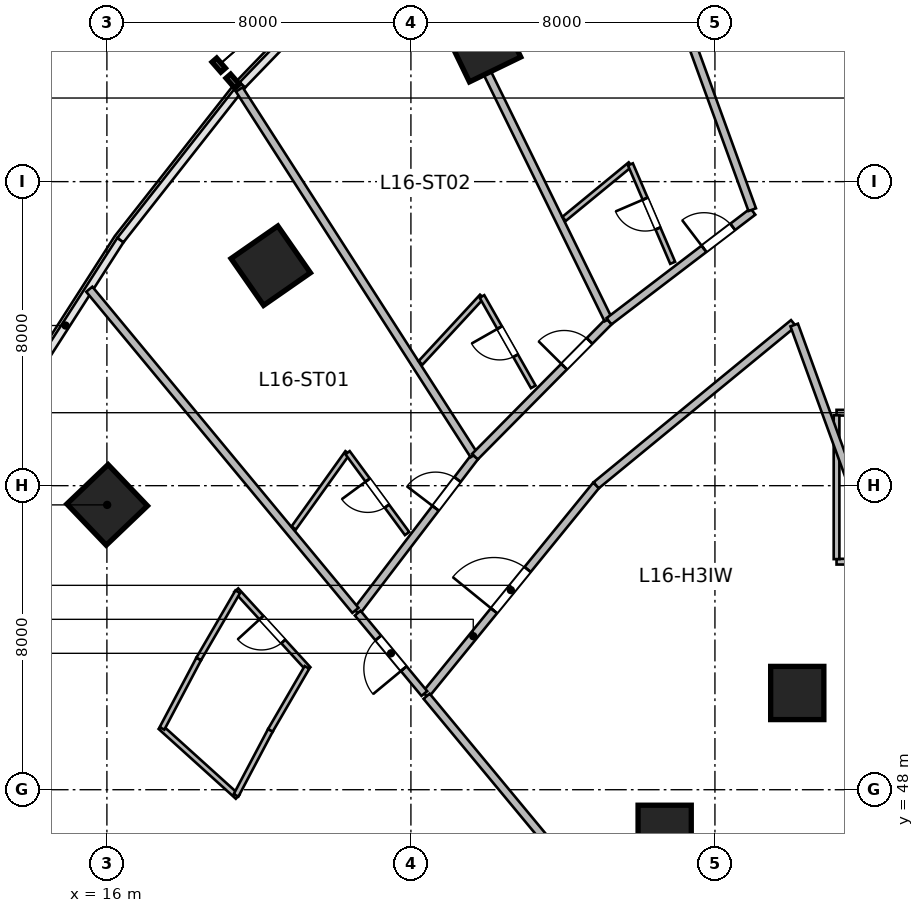
"""IFC4 building model, lengths in metres.
Left out: names, types, materials, properties, quantities, classifications, styles, units other than length and angle.
Written with IfcOpenShell. Run it as: python <this file> out.ifc"""

import sys

from ifc_helpers import new_model, si_unit, direction, frame, frame_2d, origin, origin_2d, place, context, subcontext, project, spatial, rectangle, circle, extrude, source, transform, mapped, element, fill, save


model = new_model("IFC4")
c1 = context("Model", 3, precision=1e-05, world=origin(), true_north=direction((0.0, 1.0)))
c2 = subcontext(c1, "Body", "Model", "MODEL_VIEW")
j1 = project(units=[si_unit("LENGTHUNIT", "METRE"), si_unit("PLANEANGLEUNIT", "RADIAN")], contexts=[c1])
p1 = place(None, origin())
s1 = spatial("IfcSite", under=j1, at=p1, CompositionType="ELEMENT")
p2 = place(p1, origin())
s2 = spatial("IfcBuilding", under=s1, at=p2, CompositionType="ELEMENT")
p3 = place(p2, frame((0.0, 0.0, 71.4)))
s3 = spatial("IfcBuildingStorey", under=s2, at=p3, CompositionType="ELEMENT", Elevation=71.4)
m1 = source(origin(), c2, "Body", "SweptSolid", [
    extrude(rectangle(XDim=1.5, YDim=1.5, at=origin_2d()), origin(), (0.0, 0.0, 1.0), 3.6),
])
p4 = place(p3, frame((16.007, 55.494, 0.0), z_axis=(0.0, 0.0, 1.0), x_axis=(-0.690756218984, 0.723087716626, 0.0)))
e1 = element("IfcColumn", 1, at=p4, inside=s3, PredefinedType="COLUMN", context=c2, shape_type="MappedRepresentation", body=[
    mapped(m1, transform((0.0, 0.0, 0.0), scale=1.0)),
])
m2 = source(origin(), c2, "Body", "SweptSolid", [
    extrude(circle(Radius=0.7, at=origin_2d()), origin(), (0.0, 0.0, 1.0), 3.6),
])
p5 = place(p3, frame((30.677, 46.892, 0.0), z_axis=(0.0, 0.0, 1.0), x_axis=(-0.571143442153, 0.820850271661, 0.0)))
e2 = element("IfcColumn", 2, at=p5, inside=s3, PredefinedType="COLUMN", context=c2, shape_type="MappedRepresentation", body=[
    mapped(m2, transform((0.0, 0.0, 0.0), scale=1.0)),
])
p6 = place(p3, frame((20.311, 61.789, 0.0), z_axis=(0.0, 0.0, 1.0), x_axis=(-0.571143442153, 0.820850271661, 0.0)))
e3 = element("IfcColumn", 3, at=p6, inside=s3, PredefinedType="COLUMN", context=c2, shape_type="MappedRepresentation", body=[
    mapped(m1, transform((0.0, 0.0, 0.0), scale=1.0)),
])
p7 = place(p3, frame((34.166, 50.545, 0.0), z_axis=(0.0, 0.0, 1.0), x_axis=(-0.436173672171, 0.899862504889, 0.0)))
e4 = element("IfcColumn", 4, at=p7, inside=s3, PredefinedType="COLUMN", context=c2, shape_type="MappedRepresentation", body=[
    mapped(m2, transform((0.0, 0.0, 0.0), scale=1.0)),
])
p8 = place(p3, frame((25.888, 67.627, 0.0), z_axis=(0.0, 0.0, 1.0), x_axis=(-0.436173672171, 0.899862504889, 0.0)))
e5 = element("IfcColumn", 5, at=p8, inside=s3, PredefinedType="COLUMN", context=c2, shape_type="MappedRepresentation", body=[
    mapped(m1, transform((0.0, 0.0, 0.0), scale=1.0)),
])
m3 = source(origin(), c2, "Body", "SweptSolid", [
    extrude(rectangle(XDim=6.6, YDim=0.15, at=frame_2d((3.3, 0.0))), origin(), (0.0, 0.0, 1.0), 2.803),
])
p9 = place(p3, frame((35.2, 54.0, 0.0), z_axis=(0.0, 0.0, 1.0), x_axis=(1.0, 0.0, 0.0)))
e6 = element("IfcWall", 6, at=p9, inside=s3, PredefinedType="PARTITIONING", context=c2, shape_type="MappedRepresentation", body=[
    mapped(m3, transform((0.0, 0.0, 0.0), scale=1.0)),
])
m4 = source(origin(), c2, "Body", "SweptSolid", [
    extrude(rectangle(XDim=6.6, YDim=0.15, at=frame_2d((3.3, 0.0))), origin(), (0.0, 0.0, 1.0), 3.36),
])
p10 = place(p3, frame((35.2, 57.92, 0.0), z_axis=(0.0, 0.0, 1.0), x_axis=(1.0, 0.0, 0.0)))
e7 = element("IfcWall", 7, at=p10, inside=s3, PredefinedType="PARTITIONING", context=c2, shape_type="MappedRepresentation", body=[
    mapped(m4, transform((0.0, 0.0, 0.0), scale=1.0)),
])
p11 = place(p10, frame((2.85, 0.0, 0.0)))
e8 = element("IfcOpeningElement", 8, at=p11, cuts=e7, PredefinedType="OPENING", context=c2, shape_type="SweptSolid", body=[
    extrude(rectangle(XDim=0.9, YDim=2.1, at=frame_2d((0.45, 1.05))), frame((0.0, 0.085, 0.0), z_axis=(0.0, -1.0, 0.0), x_axis=(1.0, 0.0, 0.0)), (0.0, 0.0, 1.0), 0.17),
])
m5 = source(origin(), c2, "Body", "SweptSolid", [
    extrude(rectangle(XDim=3.785, YDim=0.15, at=frame_2d((1.893, 0.0))), origin(), (0.0, 0.0, 1.0), 3.36),
])
p12 = place(p3, frame((35.2, 54.067, 0.0), z_axis=(0.0, 0.0, 1.0), x_axis=(0.0, 1.0, 0.0)))
e9 = element("IfcWall", 9, at=p12, inside=s3, PredefinedType="PARTITIONING", context=c2, shape_type="MappedRepresentation", body=[
    mapped(m5, transform((0.0, 0.0, 0.0), scale=1.0)),
])
m6 = source(origin(), c2, "Body", "SweptSolid", [
    extrude(rectangle(XDim=7.113, YDim=0.21, at=frame_2d((3.556, 0.0))), origin(), (0.0, 0.0, 1.0), 3.36),
])
p13 = place(p3, frame((24.383, 50.495, 0.0), z_axis=(0.0, 0.0, 1.0), x_axis=(0.63149032532, 0.775383755974, 0.0)))
e10 = element("IfcWall", 10, at=p13, inside=s3, PredefinedType="PARTITIONING", context=c2, shape_type="MappedRepresentation", body=[
    mapped(m6, transform((0.0, 0.0, 0.0), scale=1.0)),
])
p14 = place(p13, frame((2.856, 0.0, 0.0)))
e11 = element("IfcOpeningElement", 11, at=p14, cuts=e10, PredefinedType="OPENING", context=c2, shape_type="SweptSolid", body=[
    extrude(rectangle(XDim=1.4, YDim=2.15, at=frame_2d((0.7, 1.075))), frame((0.0, 0.115, 0.0), z_axis=(0.0, -1.0, 0.0), x_axis=(1.0, 0.0, 0.0)), (0.0, 0.0, 1.0), 0.23),
])
m7 = source(origin(), c2, "Body", "SweptSolid", [
    extrude(rectangle(XDim=6.721, YDim=0.21, at=frame_2d((3.361, 0.0))), origin(), (0.0, 0.0, 1.0), 3.36),
])
p15 = place(p3, frame((28.874, 56.01, 0.0), z_axis=(0.0, 0.0, 1.0), x_axis=(0.772828051199, 0.63461547671, 0.0)))
e12 = element("IfcWall", 12, at=p15, inside=s3, PredefinedType="PARTITIONING", context=c2, shape_type="MappedRepresentation", body=[
    mapped(m7, transform((0.0, 0.0, 0.0), scale=1.0)),
])
m8 = source(origin(), c2, "Body", "SweptSolid", [
    extrude(rectangle(XDim=11.053, YDim=0.21, at=frame_2d((5.527, 0.0))), origin(), (0.0, 0.0, 1.0), 3.36),
])
p16 = place(p3, frame((31.466, 41.949, 0.0), z_axis=(0.0, 0.0, 1.0), x_axis=(-0.638131235571, 0.769927611005, 0.0)))
e13 = element("IfcWall", 13, at=p16, inside=s3, PredefinedType="PARTITIONING", context=c2, shape_type="MappedRepresentation", body=[
    mapped(m8, transform((0.0, 0.0, 0.0), scale=1.0)),
])
m9 = source(origin(), c2, "Body", "SweptSolid", [
    extrude(rectangle(XDim=12.196, YDim=0.21, at=frame_2d((6.098, 0.0))), origin(), (0.0, 0.0, 1.0), 3.36),
])
p17 = place(p3, frame((38.258, 48.766, 0.0), z_axis=(0.0, 0.0, 1.0), x_axis=(-0.342022711534, 0.939691686031, 0.0)))
e14 = element("IfcWall", 14, at=p17, inside=s3, PredefinedType="PARTITIONING", context=c2, shape_type="MappedRepresentation", body=[
    mapped(m9, transform((0.0, 0.0, 0.0), scale=1.0)),
])
m10 = source(origin(), c2, "Body", "SweptSolid", [
    extrude(rectangle(XDim=5.135, YDim=0.21, at=frame_2d((2.567, 0.0))), origin(), (0.0, 0.0, 1.0), 3.36),
])
p18 = place(p3, frame((22.57, 52.683, 0.0), z_axis=(0.0, 0.0, 1.0), x_axis=(0.606802199649, 0.794852873494, 0.0)))
e15 = element("IfcWall", 15, at=p18, inside=s3, PredefinedType="PARTITIONING", context=c2, shape_type="MappedRepresentation", body=[
    mapped(m10, transform((0.0, 0.0, 0.0), scale=1.0)),
])
p19 = place(p18, frame((3.427, 0.0, 0.0)))
e16 = element("IfcOpeningElement", 16, at=p19, cuts=e15, PredefinedType="OPENING", context=c2, shape_type="SweptSolid", body=[
    extrude(rectangle(XDim=0.95, YDim=2.15, at=frame_2d((0.475, 1.075))), frame((0.0, 0.115, 0.0), z_axis=(0.0, -1.0, 0.0), x_axis=(1.0, 0.0, 0.0)), (0.0, 0.0, 1.0), 0.23),
])
m11 = source(origin(), c2, "Body", "SweptSolid", [
    extrude(rectangle(XDim=10.975, YDim=0.21, at=frame_2d((5.487, 0.0))), origin(), (0.0, 0.0, 1.0), 3.36),
])
p20 = place(p3, frame((22.54, 52.719, 0.0), z_axis=(0.0, 0.0, 1.0), x_axis=(-0.638125265812, 0.769932558821, 0.0)))
e17 = element("IfcWall", 17, at=p20, inside=s3, PredefinedType="PARTITIONING", context=c2, shape_type="MappedRepresentation", body=[
    mapped(m11, transform((0.0, 0.0, 0.0), scale=1.0)),
])
m12 = source(origin(), c2, "Body", "SweptSolid", [
    extrude(rectangle(XDim=11.432, YDim=0.21, at=frame_2d((5.716, 0.0))), origin(), (0.0, 0.0, 1.0), 3.36),
])
p21 = place(p3, frame((25.659, 56.805, 0.0), z_axis=(0.0, 0.0, 1.0), x_axis=(-0.540196183124, 0.841539115988, 0.0)))
e18 = element("IfcWall", 18, at=p21, inside=s3, PredefinedType="PARTITIONING", context=c2, shape_type="MappedRepresentation", body=[
    mapped(m12, transform((0.0, 0.0, 0.0), scale=1.0)),
])
m13 = source(origin(), c2, "Body", "SweptSolid", [
    extrude(rectangle(XDim=2.437, YDim=0.14, at=frame_2d((1.218, 0.0))), origin(), (0.0, 0.0, 1.0), 3.36),
])
p22 = place(p3, frame((20.915, 54.886, 0.0), z_axis=(0.0, 0.0, 1.0), x_axis=(0.581797219134, 0.813333877204, 0.0)))
e19 = element("IfcWall", 19, at=p22, inside=s3, PredefinedType="PARTITIONING", context=c2, shape_type="MappedRepresentation", body=[
    mapped(m13, transform((0.0, 0.0, 0.0), scale=1.0)),
])
m14 = source(origin(), c2, "Body", "SweptSolid", [
    extrude(rectangle(XDim=2.642, YDim=0.14, at=frame_2d((1.321, 0.0))), origin(), (0.0, 0.0, 1.0), 3.36),
])
p23 = place(p3, frame((23.899, 54.741, 0.0), z_axis=(0.0, 0.0, 1.0), x_axis=(-0.592789122423, 0.805357719487, 0.0)))
e20 = element("IfcWall", 20, at=p23, inside=s3, PredefinedType="PARTITIONING", context=c2, shape_type="MappedRepresentation", body=[
    mapped(m14, transform((0.0, 0.0, 0.0), scale=1.0)),
])
p24 = place(p23, frame((0.896, 0.0, 0.0)))
e21 = element("IfcOpeningElement", 21, at=p24, cuts=e20, PredefinedType="OPENING", context=c2, shape_type="SweptSolid", body=[
    extrude(rectangle(XDim=0.85, YDim=2.05, at=frame_2d((0.425, 1.025))), frame((0.0, 0.08, 0.0), z_axis=(0.0, -1.0, 0.0), x_axis=(1.0, 0.0, 0.0)), (0.0, 0.0, 1.0), 0.16),
])
m15 = source(origin(), c2, "Body", "SweptSolid", [
    extrude(rectangle(XDim=5.012, YDim=0.21, at=frame_2d((2.506, 0.0))), origin(), (0.0, 0.0, 1.0), 3.36),
])
p25 = place(p3, frame((25.685, 56.764, 0.0), z_axis=(0.0, 0.0, 1.0), x_axis=(0.703664626435, 0.710532260707, 0.0)))
e22 = element("IfcWall", 22, at=p25, inside=s3, PredefinedType="PARTITIONING", context=c2, shape_type="MappedRepresentation", body=[
    mapped(m15, transform((0.0, 0.0, 0.0), scale=1.0)),
])
p26 = place(p25, frame((3.335, 0.0, 0.0)))
e23 = element("IfcOpeningElement", 23, at=p26, cuts=e22, PredefinedType="OPENING", context=c2, shape_type="SweptSolid", body=[
    extrude(rectangle(XDim=0.95, YDim=2.15, at=frame_2d((0.475, 1.075))), frame((0.0, 0.115, 0.0), z_axis=(0.0, -1.0, 0.0), x_axis=(1.0, 0.0, 0.0)), (0.0, 0.0, 1.0), 0.23),
])
m16 = source(origin(), c2, "Body", "SweptSolid", [
    extrude(rectangle(XDim=11.775, YDim=0.21, at=frame_2d((5.887, 0.0))), origin(), (0.0, 0.0, 1.0), 2.644),
])
p27 = place(p3, frame((29.19, 60.371, 0.0), z_axis=(0.0, 0.0, 1.0), x_axis=(-0.4401500056, 0.897924257702, 0.0)))
e24 = element("IfcWall", 24, at=p27, inside=s3, PredefinedType="PARTITIONING", context=c2, shape_type="MappedRepresentation", body=[
    mapped(m16, transform((0.0, 0.0, 0.0), scale=1.0)),
])
m17 = source(origin(), c2, "Body", "SweptSolid", [
    extrude(rectangle(XDim=2.38, YDim=0.14, at=frame_2d((1.19, 0.0))), origin(), (0.0, 0.0, 1.0), 3.36),
])
p28 = place(p3, frame((24.253, 59.231, 0.0), z_axis=(0.0, 0.0, 1.0), x_axis=(0.679084816758, 0.734059814762, 0.0)))
e25 = element("IfcWall", 25, at=p28, inside=s3, PredefinedType="PARTITIONING", context=c2, shape_type="MappedRepresentation", body=[
    mapped(m17, transform((0.0, 0.0, 0.0), scale=1.0)),
])
m18 = source(origin(), c2, "Body", "SweptSolid", [
    extrude(rectangle(XDim=2.735, YDim=0.14, at=frame_2d((1.367, 0.0))), origin(), (0.0, 0.0, 1.0), 3.36),
])
p29 = place(p3, frame((27.219, 58.6, 0.0), z_axis=(0.0, 0.0, 1.0), x_axis=(-0.493694940578, 0.869635156631, 0.0)))
e26 = element("IfcWall", 26, at=p29, inside=s3, PredefinedType="PARTITIONING", context=c2, shape_type="MappedRepresentation", body=[
    mapped(m18, transform((0.0, 0.0, 0.0), scale=1.0)),
])
p30 = place(p29, frame((0.942, 0.0, 0.0)))
e27 = element("IfcOpeningElement", 27, at=p30, cuts=e26, PredefinedType="OPENING", context=c2, shape_type="SweptSolid", body=[
    extrude(rectangle(XDim=0.85, YDim=2.05, at=frame_2d((0.425, 1.025))), frame((0.0, 0.08, 0.0), z_axis=(0.0, -1.0, 0.0), x_axis=(1.0, 0.0, 0.0)), (0.0, 0.0, 1.0), 0.16),
])
m19 = source(origin(), c2, "Body", "SweptSolid", [
    extrude(rectangle(XDim=4.762, YDim=0.21, at=frame_2d((2.381, 0.0))), origin(), (0.0, 0.0, 1.0), 3.36),
])
p31 = place(p3, frame((29.212, 60.326, 0.0), z_axis=(0.0, 0.0, 1.0), x_axis=(0.795070295872, 0.60651729128, 0.0)))
e28 = element("IfcWall", 28, at=p31, inside=s3, PredefinedType="PARTITIONING", context=c2, shape_type="MappedRepresentation", body=[
    mapped(m19, transform((0.0, 0.0, 0.0), scale=1.0)),
])
p32 = place(p31, frame((3.144, 0.0, 0.0)))
e29 = element("IfcOpeningElement", 29, at=p32, cuts=e28, PredefinedType="OPENING", context=c2, shape_type="SweptSolid", body=[
    extrude(rectangle(XDim=0.95, YDim=2.15, at=frame_2d((0.475, 1.075))), frame((0.0, 0.115, 0.0), z_axis=(0.0, -1.0, 0.0), x_axis=(1.0, 0.0, 0.0)), (0.0, 0.0, 1.0), 0.23),
])
m20 = source(origin(), c2, "Body", "SweptSolid", [
    extrude(rectangle(XDim=12.088, YDim=0.21, at=frame_2d((6.044, 0.0))), origin(), (0.0, 0.0, 1.0), 3.36),
])
p33 = place(p3, frame((32.981, 63.262, 0.0), z_axis=(0.0, 0.0, 1.0), x_axis=(-0.34203007529, 0.939689005787, 0.0)))
e30 = element("IfcWall", 30, at=p33, inside=s3, PredefinedType="PARTITIONING", context=c2, shape_type="MappedRepresentation", body=[
    mapped(m20, transform((0.0, 0.0, 0.0), scale=1.0)),
])
m21 = source(origin(), c2, "Body", "SweptSolid", [
    extrude(rectangle(XDim=2.26, YDim=0.14, at=frame_2d((1.13, 0.0))), origin(), (0.0, 0.0, 1.0), 3.36),
])
p34 = place(p3, frame((28.029, 63.02, 0.0), z_axis=(0.0, 0.0, 1.0), x_axis=(0.772646789219, 0.634836151388, 0.0)))
e31 = element("IfcWall", 31, at=p34, inside=s3, PredefinedType="PARTITIONING", context=c2, shape_type="MappedRepresentation", body=[
    mapped(m21, transform((0.0, 0.0, 0.0), scale=1.0)),
])
m22 = source(origin(), c2, "Body", "SweptSolid", [
    extrude(rectangle(XDim=2.819, YDim=0.14, at=frame_2d((1.409, 0.0))), origin(), (0.0, 0.0, 1.0), 3.36),
])
p35 = place(p3, frame((30.888, 61.864, 0.0), z_axis=(0.0, 0.0, 1.0), x_axis=(-0.394420979357, 0.918929861874, 0.0)))
e32 = element("IfcWall", 32, at=p35, inside=s3, PredefinedType="PARTITIONING", context=c2, shape_type="MappedRepresentation", body=[
    mapped(m22, transform((0.0, 0.0, 0.0), scale=1.0)),
])
p36 = place(p35, frame((0.984, 0.0, 0.0)))
e33 = element("IfcOpeningElement", 33, at=p36, cuts=e32, PredefinedType="OPENING", context=c2, shape_type="SweptSolid", body=[
    extrude(rectangle(XDim=0.85, YDim=2.05, at=frame_2d((0.425, 1.025))), frame((0.0, 0.08, 0.0), z_axis=(0.0, -1.0, 0.0), x_axis=(1.0, 0.0, 0.0)), (0.0, 0.0, 1.0), 0.16),
])
m23 = source(origin(), c2, "Body", "SweptSolid", [
    extrude(rectangle(XDim=2.748, YDim=0.195, at=frame_2d((1.374, 0.0))), origin(), (0.0, 0.0, 1.0), 3.36),
])
p37 = place(p3, frame((24.353, 50.531, 0.0), z_axis=(0.0, 0.0, 1.0), x_axis=(-0.638111168284, 0.769944242729, 0.0)))
e34 = element("IfcWall", 34, at=p37, inside=s3, PredefinedType="PARTITIONING", context=c2, shape_type="MappedRepresentation", body=[
    mapped(m23, transform((0.0, 0.0, 0.0), scale=1.0)),
])
p38 = place(p37, frame((0.849, 0.0, 0.0)))
e35 = element("IfcOpeningElement", 35, at=p38, cuts=e34, PredefinedType="OPENING", context=c2, shape_type="SweptSolid", body=[
    extrude(rectangle(XDim=1.05, YDim=2.15, at=frame_2d((0.525, 1.075))), frame((0.0, 0.107, 0.0), z_axis=(0.0, -1.0, 0.0), x_axis=(1.0, 0.0, 0.0)), (0.0, 0.0, 1.0), 0.215),
])
m24 = source(origin(), c2, "Body", "SweptSolid", [
    extrude(rectangle(XDim=2.812, YDim=0.14, at=frame_2d((1.406, 0.0))), origin(), (0.0, 0.0, 1.0), 3.36),
])
p39 = place(p3, frame((21.303, 51.177, 0.0), z_axis=(0.0, 0.0, 1.0), x_axis=(-0.675119025852, 0.737708818527, 0.0)))
e36 = element("IfcWall", 36, at=p39, inside=s3, PredefinedType="PARTITIONING", context=c2, shape_type="MappedRepresentation", body=[
    mapped(m24, transform((0.0, 0.0, 0.0), scale=1.0)),
])
p40 = place(p39, frame((0.981, 0.0, 0.0)))
e37 = element("IfcOpeningElement", 37, at=p40, cuts=e36, PredefinedType="OPENING", context=c2, shape_type="SweptSolid", body=[
    extrude(rectangle(XDim=0.85, YDim=2.05, at=frame_2d((0.425, 1.025))), frame((0.0, 0.08, 0.0), z_axis=(0.0, -1.0, 0.0), x_axis=(1.0, 0.0, 0.0)), (0.0, 0.0, 1.0), 0.16),
])
m25 = source(origin(), c2, "Body", "SweptSolid", [
    extrude(rectangle(XDim=2.738, YDim=0.14, at=frame_2d((1.369, 0.0))), origin(), (0.0, 0.0, 1.0), 3.36),
])
p41 = place(p3, frame((19.44, 47.814, 0.0), z_axis=(0.0, 0.0, 1.0), x_axis=(-0.741873676582, 0.670539669218, 0.0)))
e38 = element("IfcWall", 38, at=p41, inside=s3, PredefinedType="PARTITIONING", context=c2, shape_type="MappedRepresentation", body=[
    mapped(m25, transform((0.0, 0.0, 0.0), scale=1.0)),
])
m26 = source(origin(), c2, "Body", "SweptSolid", [
    extrude(rectangle(XDim=1.936, YDim=0.14, at=frame_2d((0.968, 0.0))), origin(), (0.0, 0.0, 1.0), 3.36),
])
p42 = place(p3, frame((19.398, 47.852, 0.0), z_axis=(0.0, 0.0, 1.0), x_axis=(0.467174971862, 0.884164886017, 0.0)))
e39 = element("IfcWall", 39, at=p42, inside=s3, PredefinedType="PARTITIONING", context=c2, shape_type="MappedRepresentation", body=[
    mapped(m26, transform((0.0, 0.0, 0.0), scale=1.0)),
])
m27 = source(origin(), c2, "Body", "SweptSolid", [
    extrude(rectangle(XDim=2.068, YDim=0.14, at=frame_2d((1.034, 0.0))), origin(), (0.0, 0.0, 1.0), 3.36),
])
p43 = place(p3, frame((17.45, 49.612, 0.0), z_axis=(0.0, 0.0, 1.0), x_axis=(0.467215057643, 0.884143704333, 0.0)))
e40 = element("IfcWall", 40, at=p43, inside=s3, PredefinedType="PARTITIONING", context=c2, shape_type="MappedRepresentation", body=[
    mapped(m27, transform((0.0, 0.0, 0.0), scale=1.0)),
])
m28 = source(origin(), c2, "Body", "SweptSolid", [
    extrude(rectangle(XDim=1.914, YDim=0.14, at=frame_2d((0.957, 0.0))), origin(), (0.0, 0.0, 1.0), 3.36),
])
p44 = place(p3, frame((20.303, 49.563, 0.0), z_axis=(0.0, 0.0, 1.0), x_axis=(0.502347790612, 0.864665656347, 0.0)))
e41 = element("IfcWall", 41, at=p44, inside=s3, PredefinedType="PARTITIONING", context=c2, shape_type="MappedRepresentation", body=[
    mapped(m28, transform((0.0, 0.0, 0.0), scale=1.0)),
])
m29 = source(origin(), c2, "Body", "SweptSolid", [
    extrude(rectangle(XDim=2.045, YDim=0.14, at=frame_2d((1.022, 0.0))), origin(), (0.0, 0.0, 1.0), 3.36),
])
p45 = place(p3, frame((18.416, 51.441, 0.0), z_axis=(0.0, 0.0, 1.0), x_axis=(0.5023112139, 0.864686905411, 0.0)))
e42 = element("IfcWall", 42, at=p45, inside=s3, PredefinedType="PARTITIONING", context=c2, shape_type="MappedRepresentation", body=[
    mapped(m29, transform((0.0, 0.0, 0.0), scale=1.0)),
])
m30 = source(origin(), c2, "Body", "SweptSolid", [
    extrude(rectangle(XDim=1.4, YDim=2.15, at=frame_2d((0.7, 1.075))), frame((0.0, 0.025, 0.0), z_axis=(0.0, -1.0, 0.0), x_axis=(1.0, 0.0, 0.0)), (0.0, 0.0, 1.0), 0.05),
])
p46 = place(p14, origin())
e43 = element("IfcDoor", 43, at=p46, inside=s3, OperationType="SINGLE_SWING_LEFT", PredefinedType="DOOR", context=c2, shape_type="MappedRepresentation", body=[
    mapped(m30, transform((0.0, 0.0, 0.0), scale=1.0)),
])
fill(e11, e43)
m31 = source(origin(), c2, "Body", "SweptSolid", [
    extrude(rectangle(XDim=0.95, YDim=2.15, at=frame_2d((0.475, 1.075))), frame((0.0, 0.025, 0.0), z_axis=(0.0, -1.0, 0.0), x_axis=(1.0, 0.0, 0.0)), (0.0, 0.0, 1.0), 0.05),
])
p47 = place(p19, origin())
e44 = element("IfcDoor", 44, at=p47, inside=s3, OperationType="SINGLE_SWING_LEFT", PredefinedType="DOOR", context=c2, shape_type="MappedRepresentation", body=[
    mapped(m31, transform((0.0, 0.0, 0.0), scale=1.0)),
])
fill(e16, e44)
m32 = source(origin(), c2, "Body", "SweptSolid", [
    extrude(rectangle(XDim=0.85, YDim=2.05, at=frame_2d((0.425, 1.025))), frame((0.0, 0.025, 0.0), z_axis=(0.0, -1.0, 0.0), x_axis=(1.0, 0.0, 0.0)), (0.0, 0.0, 1.0), 0.05),
])
p48 = place(p24, origin())
e45 = element("IfcDoor", 45, at=p48, inside=s3, OperationType="SINGLE_SWING_RIGHT", PredefinedType="DOOR", context=c2, shape_type="MappedRepresentation", body=[
    mapped(m32, transform((0.0, 0.0, 0.0), scale=1.0)),
])
fill(e21, e45)
p49 = place(p26, origin())
e46 = element("IfcDoor", 46, at=p49, inside=s3, OperationType="SINGLE_SWING_LEFT", PredefinedType="DOOR", context=c2, shape_type="MappedRepresentation", body=[
    mapped(m31, transform((0.0, 0.0, 0.0), scale=1.0)),
])
fill(e23, e46)
p50 = place(p30, origin())
e47 = element("IfcDoor", 47, at=p50, inside=s3, OperationType="SINGLE_SWING_RIGHT", PredefinedType="DOOR", context=c2, shape_type="MappedRepresentation", body=[
    mapped(m32, transform((0.0, 0.0, 0.0), scale=1.0)),
])
fill(e27, e47)
p51 = place(p32, origin())
e48 = element("IfcDoor", 48, at=p51, inside=s3, OperationType="SINGLE_SWING_LEFT", PredefinedType="DOOR", context=c2, shape_type="MappedRepresentation", body=[
    mapped(m31, transform((0.0, 0.0, 0.0), scale=1.0)),
])
fill(e29, e48)
p52 = place(p36, origin())
e49 = element("IfcDoor", 49, at=p52, inside=s3, OperationType="SINGLE_SWING_RIGHT", PredefinedType="DOOR", context=c2, shape_type="MappedRepresentation", body=[
    mapped(m32, transform((0.0, 0.0, 0.0), scale=1.0)),
])
fill(e33, e49)
m33 = source(origin(), c2, "Body", "SweptSolid", [
    extrude(rectangle(XDim=1.05, YDim=2.15, at=frame_2d((0.525, 1.075))), frame((0.0, 0.025, 0.0), z_axis=(0.0, -1.0, 0.0), x_axis=(1.0, 0.0, 0.0)), (0.0, 0.0, 1.0), 0.05),
])
p53 = place(p38, origin())
e50 = element("IfcDoor", 50, at=p53, inside=s3, OperationType="SINGLE_SWING_LEFT", PredefinedType="DOOR", context=c2, shape_type="MappedRepresentation", body=[
    mapped(m33, transform((0.0, 0.0, 0.0), scale=1.0)),
])
fill(e35, e50)
p54 = place(p40, origin())
e51 = element("IfcDoor", 51, at=p54, inside=s3, OperationType="SINGLE_SWING_RIGHT", PredefinedType="DOOR", context=c2, shape_type="MappedRepresentation", body=[
    mapped(m32, transform((0.0, 0.0, 0.0), scale=1.0)),
])
fill(e37, e51)
save(model, sys.argv[1])
